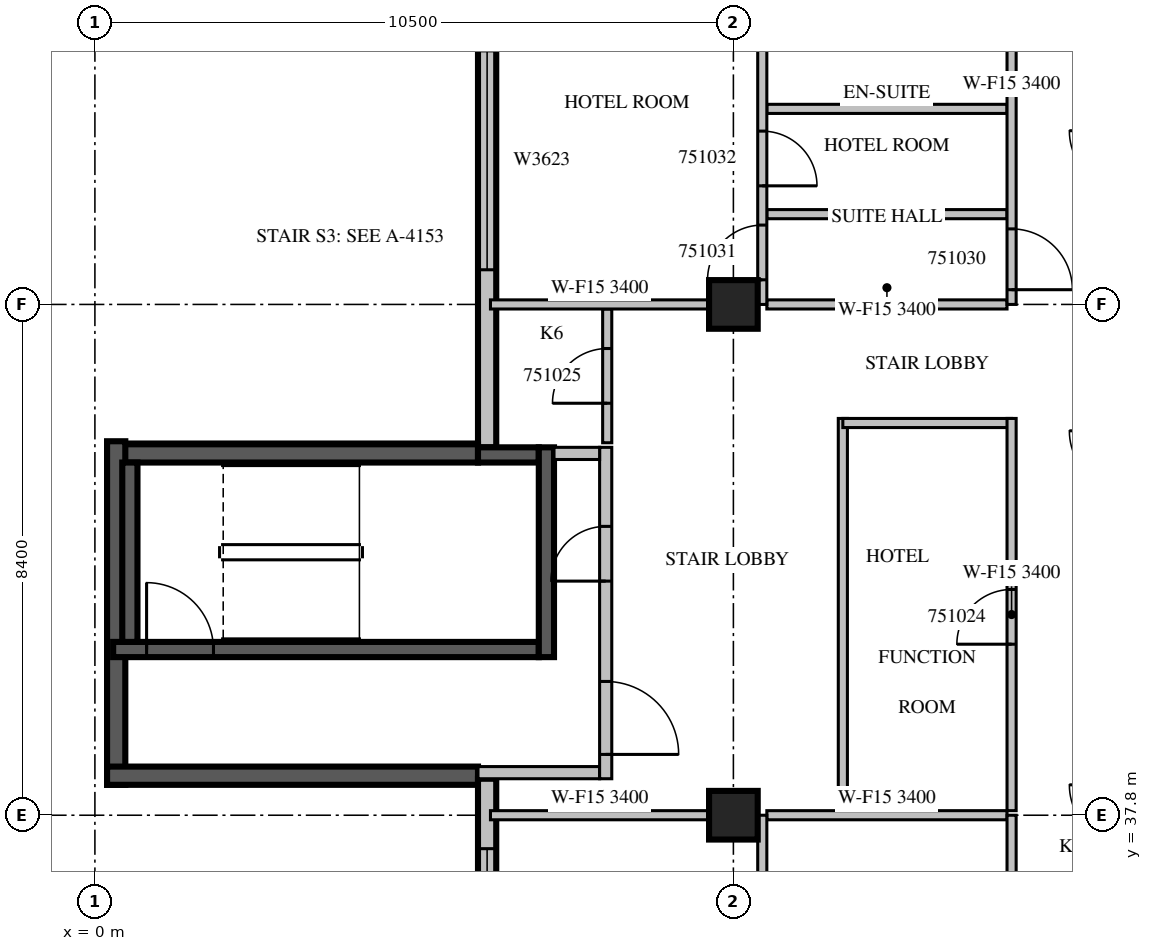
"""IFC4 building model, lengths in metres.
Left out: names, types, materials, properties, quantities, classifications, styles, units other than length and angle.
Written with IfcOpenShell. Run it as: python <this file> out.ifc"""

import sys

from ifc_helpers import new_model, si_unit, direction, frame, frame_2d, origin, origin_2d, place, context, subcontext, project, spatial, rectangle, extrude, source, transform, mapped, element, fill, save


model = new_model("IFC4")
c1 = context("Model", 3, precision=1e-05, world=origin(), true_north=direction((0.0, 1.0)))
c2 = subcontext(c1, "Body", "Model", "MODEL_VIEW")
j1 = project(units=[si_unit("LENGTHUNIT", "METRE"), si_unit("PLANEANGLEUNIT", "RADIAN")], contexts=[c1])
p1 = place(None, origin())
s1 = spatial("IfcSite", under=j1, at=p1, CompositionType="ELEMENT")
p2 = place(p1, origin())
s2 = spatial("IfcBuilding", under=s1, at=p2, CompositionType="ELEMENT")
p3 = place(p2, frame((0.0, 0.0, 227.2)))
s3 = spatial("IfcBuildingStorey", under=s2, at=p3, CompositionType="ELEMENT", Elevation=227.2)
m1 = source(origin(), c2, "Body", "SweptSolid", [
    extrude(rectangle(XDim=0.8, YDim=0.8, at=origin_2d()), origin(), (0.0, 0.0, 1.0), 3.8),
])
for number, where, z_axis, x_axis in (
    (1, (10.5, 37.8, 0.0), (0.0, 0.0, 1.0), (1.0, 0.0, 0.0)),
    (2, (10.5, 46.2, 0.0), (0.0, 0.0, 1.0), (1.0, 0.0, 0.0)),
):
    element("IfcColumn", number, at=place(p3, frame(where, z_axis=z_axis, x_axis=x_axis)), inside=s3, PredefinedType="COLUMN", context=c2, shape_type="MappedRepresentation", body=[
        mapped(m1, transform((0.0, 0.0, 0.0), scale=1.0)),
    ])
m2 = source(origin(), c2, "Body", "SweptSolid", [
    extrude(rectangle(XDim=9.91, YDim=0.3, at=frame_2d((4.955, 0.0))), origin(), (0.0, 0.0, 1.0), 3.4),
])
p4 = place(p3, frame((6.45, 53.76, 0.0), z_axis=(0.0, 0.0, 1.0), x_axis=(0.0, -1.0, 0.0)))
e3 = element("IfcWall", 3, at=p4, inside=s3, PredefinedType="STANDARD", context=c2, shape_type="MappedRepresentation", body=[
    mapped(m2, transform((0.0, 0.0, 0.0), scale=1.0)),
])
m3 = source(origin(), c2, "Body", "SweptSolid", [
    extrude(rectangle(XDim=3.6, YDim=2.3, at=frame_2d((1.8, 1.15))), frame((0.0, 0.16, 0.0), z_axis=(0.0, -1.0, 0.0), x_axis=(1.0, 0.0, 0.0)), (0.0, 0.0, 1.0), 0.32),
])
p5 = place(p4, frame((3.39, 0.0, 0.6)))
e4 = element("IfcOpeningElement", 4, at=p5, cuts=e3, PredefinedType="OPENING", context=c2, shape_type="MappedRepresentation", body=[
    mapped(m3, transform((0.0, 0.0, 0.0), scale=1.0)),
])
m4 = source(origin(), c2, "Body", "SweptSolid", [
    extrude(rectangle(XDim=2.4, YDim=2.3, at=frame_2d((1.2, 1.15))), frame((0.0, 0.16, 0.0), z_axis=(0.0, -1.0, 0.0), x_axis=(1.0, 0.0, 0.0)), (0.0, 0.0, 1.0), 0.32),
])
p6 = place(p4, frame((0.495, 0.0, 0.6)))
e5 = element("IfcOpeningElement", 5, at=p6, cuts=e3, PredefinedType="OPENING", context=c2, shape_type="MappedRepresentation", body=[
    mapped(m4, transform((0.0, 0.0, 0.0), scale=1.0)),
])
m5 = source(origin(), c2, "Body", "SweptSolid", [
    extrude(rectangle(XDim=6.1, YDim=0.3, at=frame_2d((3.05, 0.0))), origin(), (0.0, 0.0, 1.0), 3.4),
])
p7 = place(p3, frame((6.3, 43.75, 0.0), z_axis=(0.0, 0.0, 1.0), x_axis=(-1.0, 0.0, 0.0)))
e6 = element("IfcWall", 6, at=p7, inside=s3, PredefinedType="SOLIDWALL", context=c2, shape_type="MappedRepresentation", body=[
    mapped(m5, transform((0.0, 0.0, 0.0), scale=1.0)),
])
m6 = source(origin(), c2, "Body", "SweptSolid", [
    extrude(rectangle(XDim=5.65, YDim=0.3, at=frame_2d((2.825, 0.0))), origin(), (0.0, 0.0, 1.0), 3.4),
])
p8 = place(p3, frame((0.35, 43.95, 0.0), z_axis=(0.0, 0.0, 1.0), x_axis=(0.0, -1.0, 0.0)))
e7 = element("IfcWall", 7, at=p8, inside=s3, PredefinedType="SOLIDWALL", context=c2, shape_type="MappedRepresentation", body=[
    mapped(m6, transform((0.0, 0.0, 0.0), scale=1.0)),
])
p9 = place(p3, frame((0.2, 38.45, 0.0), z_axis=(0.0, 0.0, 1.0), x_axis=(1.0, 0.0, 0.0)))
e8 = element("IfcWall", 8, at=p9, inside=s3, PredefinedType="SOLIDWALL", context=c2, shape_type="MappedRepresentation", body=[
    mapped(m5, transform((0.0, 0.0, 0.0), scale=1.0)),
])
m7 = source(origin(), c2, "Body", "SweptSolid", [
    extrude(rectangle(XDim=4.2, YDim=0.3, at=frame_2d((2.1, 0.0))), origin(), (0.0, 0.0, 1.0), 3.4),
])
p10 = place(p3, frame((6.45, 38.4, 0.0), z_axis=(0.0, 0.0, 1.0), x_axis=(0.0, -1.0, 0.0)))
e9 = element("IfcWall", 9, at=p10, inside=s3, PredefinedType="STANDARD", context=c2, shape_type="MappedRepresentation", body=[
    mapped(m7, transform((0.0, 0.0, 0.0), scale=1.0)),
])
m8 = source(origin(), c2, "Body", "SweptSolid", [
    extrude(rectangle(XDim=1.8, YDim=2.3, at=frame_2d((0.9, 1.15))), frame((0.0, 0.16, 0.0), z_axis=(0.0, -1.0, 0.0), x_axis=(1.0, 0.0, 0.0)), (0.0, 0.0, 1.0), 0.32),
])
p11 = place(p10, frame((1.15, 0.0, 0.6)))
e10 = element("IfcOpeningElement", 10, at=p11, cuts=e9, PredefinedType="OPENING", context=c2, shape_type="MappedRepresentation", body=[
    mapped(m8, transform((0.0, 0.0, 0.0), scale=1.0)),
])
m9 = source(origin(), c2, "Body", "SweptSolid", [
    extrude(rectangle(XDim=7.0, YDim=0.25, at=frame_2d((3.5, 0.0))), origin(), (0.0, 0.0, 1.0), 3.4),
])
p12 = place(p3, frame((0.3, 40.525, 0.0), z_axis=(0.0, 0.0, 1.0), x_axis=(1.0, 0.0, 0.0)))
e11 = element("IfcWall", 11, at=p12, inside=s3, PredefinedType="SOLIDWALL", context=c2, shape_type="MappedRepresentation", body=[
    mapped(m9, transform((0.0, 0.0, 0.0), scale=1.0)),
])
m10 = source(origin(), c2, "Body", "SweptSolid", [
    extrude(rectangle(XDim=1.1, YDim=2.1, at=frame_2d((0.55, 1.05))), frame((0.0, 0.135, 0.0), z_axis=(0.0, -1.0, 0.0), x_axis=(1.0, 0.0, 0.0)), (0.0, 0.0, 1.0), 0.27),
])
p13 = place(p12, frame((0.55, 0.0, 0.0)))
e12 = element("IfcOpeningElement", 12, at=p13, cuts=e11, PredefinedType="OPENING", context=c2, shape_type="MappedRepresentation", body=[
    mapped(m10, transform((0.0, 0.0, 0.0), scale=1.0)),
])
m11 = source(origin(), c2, "Body", "SweptSolid", [
    extrude(rectangle(XDim=1.0, YDim=0.25, at=frame_2d((0.5, 0.0))), origin(), (0.0, 0.0, 1.0), 3.4),
])
p14 = place(p3, frame((6.3, 43.725, 0.0), z_axis=(0.0, 0.0, 1.0), x_axis=(1.0, 0.0, 0.0)))
e13 = element("IfcWall", 13, at=p14, inside=s3, PredefinedType="SOLIDWALL", context=c2, shape_type="MappedRepresentation", body=[
    mapped(m11, transform((0.0, 0.0, 0.0), scale=1.0)),
])
m12 = source(origin(), c2, "Body", "SweptSolid", [
    extrude(rectangle(XDim=3.45, YDim=0.25, at=frame_2d((1.725, 0.0))), origin(), (0.0, 0.0, 1.0), 3.4),
])
p15 = place(p3, frame((7.425, 40.4, 0.0), z_axis=(0.0, 0.0, 1.0), x_axis=(0.0, 1.0, 0.0)))
e14 = element("IfcWall", 14, at=p15, inside=s3, PredefinedType="SOLIDWALL", context=c2, shape_type="MappedRepresentation", body=[
    mapped(m12, transform((0.0, 0.0, 0.0), scale=1.0)),
])
m13 = source(origin(), c2, "Body", "SweptSolid", [
    extrude(rectangle(XDim=2.95, YDim=0.25, at=frame_2d((1.475, 0.0))), origin(), (0.0, 0.0, 1.0), 3.4),
])
p16 = place(p3, frame((0.575, 40.65, 0.0), z_axis=(0.0, 0.0, 1.0), x_axis=(0.0, 1.0, 0.0)))
e15 = element("IfcWall", 15, at=p16, inside=s3, PredefinedType="SOLIDWALL", context=c2, shape_type="MappedRepresentation", body=[
    mapped(m13, transform((0.0, 0.0, 0.0), scale=1.0)),
])
m14 = source(origin(), c2, "Body", "SweptSolid", [
    extrude(rectangle(XDim=2.0, YDim=0.2, at=frame_2d((1.0, 0.0))), origin(), (0.0, 0.0, 1.0), 3.4),
])
p17 = place(p3, frame((6.3, 38.5, 0.0), z_axis=(0.0, 0.0, 1.0), x_axis=(1.0, 0.0, 0.0)))
e16 = element("IfcWall", 16, at=p17, inside=s3, PredefinedType="PARTITIONING", context=c2, shape_type="MappedRepresentation", body=[
    mapped(m14, transform((0.0, 0.0, 0.0), scale=1.0)),
])
m15 = source(origin(), c2, "Body", "SweptSolid", [
    extrude(rectangle(XDim=5.45, YDim=0.2, at=frame_2d((2.725, 0.0))), origin(), (0.0, 0.0, 1.0), 3.4),
])
p18 = place(p3, frame((8.4, 38.4, 0.0), z_axis=(0.0, 0.0, 1.0), x_axis=(0.0, 1.0, 0.0)))
e17 = element("IfcWall", 17, at=p18, inside=s3, PredefinedType="PARTITIONING", context=c2, shape_type="MappedRepresentation", body=[
    mapped(m15, transform((0.0, 0.0, 0.0), scale=1.0)),
])
m16 = source(origin(), c2, "Body", "SweptSolid", [
    extrude(rectangle(XDim=1.2, YDim=2.1, at=frame_2d((0.6, 1.05))), frame((0.0, 0.11, 0.0), z_axis=(0.0, -1.0, 0.0), x_axis=(1.0, 0.0, 0.0)), (0.0, 0.0, 1.0), 0.22),
])
p19 = place(p18, frame((0.4, 0.0, 0.0)))
e18 = element("IfcOpeningElement", 18, at=p19, cuts=e17, PredefinedType="OPENING", context=c2, shape_type="MappedRepresentation", body=[
    mapped(m16, transform((0.0, 0.0, 0.0), scale=1.0)),
])
m17 = source(origin(), c2, "Body", "SweptSolid", [
    extrude(rectangle(XDim=0.9, YDim=2.1, at=frame_2d((0.45, 1.05))), frame((0.0, 0.11, 0.0), z_axis=(0.0, -1.0, 0.0), x_axis=(1.0, 0.0, 0.0)), (0.0, 0.0, 1.0), 0.22),
])
p20 = place(p18, frame((3.25, 0.0, 0.0)))
e19 = element("IfcOpeningElement", 19, at=p20, cuts=e17, PredefinedType="OPENING", context=c2, shape_type="MappedRepresentation", body=[
    mapped(m17, transform((0.0, 0.0, 0.0), scale=1.0)),
])
m18 = source(origin(), c2, "Body", "SweptSolid", [
    extrude(rectangle(XDim=0.75, YDim=0.2, at=frame_2d((0.375, 0.0))), origin(), (0.0, 0.0, 1.0), 3.4),
])
p21 = place(p3, frame((7.55, 43.75, 0.0), z_axis=(0.0, 0.0, 1.0), x_axis=(1.0, 0.0, 0.0)))
e20 = element("IfcWall", 20, at=p21, inside=s3, PredefinedType="PARTITIONING", context=c2, shape_type="MappedRepresentation", body=[
    mapped(m18, transform((0.0, 0.0, 0.0), scale=1.0)),
])
m19 = source(origin(), c2, "Body", "SweptSolid", [
    extrude(rectangle(XDim=6.45, YDim=0.15, at=frame_2d((3.225, 0.0))), origin(), (0.0, 0.0, 1.0), 3.4),
])
p22 = place(p3, frame((12.3, 44.325, 0.0), z_axis=(0.0, 0.0, 1.0), x_axis=(0.0, -1.0, 0.0)))
e21 = element("IfcWall", 21, at=p22, inside=s3, PredefinedType="PARTITIONING", context=c2, shape_type="MappedRepresentation", body=[
    mapped(m19, transform((0.0, 0.0, 0.0), scale=1.0)),
])
m20 = source(origin(), c2, "Body", "SweptSolid", [
    extrude(rectangle(XDim=2.775, YDim=0.15, at=frame_2d((1.387, 0.0))), origin(), (0.0, 0.0, 1.0), 3.4),
])
p23 = place(p3, frame((15.075, 44.25, 0.0), z_axis=(0.0, 0.0, 1.0), x_axis=(-1.0, 0.0, 0.0)))
e22 = element("IfcWall", 22, at=p23, inside=s3, PredefinedType="PARTITIONING", context=c2, shape_type="MappedRepresentation", body=[
    mapped(m20, transform((0.0, 0.0, 0.0), scale=1.0)),
])
p24 = place(p3, frame((15.075, 37.875, 0.0), z_axis=(0.0, 0.0, 1.0), x_axis=(0.0, 1.0, 0.0)))
e23 = element("IfcWall", 23, at=p24, inside=s3, PredefinedType="PARTITIONING", context=c2, shape_type="MappedRepresentation", body=[
    mapped(m19, transform((0.0, 0.0, 0.0), scale=1.0)),
])
m21 = source(origin(), c2, "Body", "SweptSolid", [
    extrude(rectangle(XDim=0.9, YDim=2.1, at=frame_2d((0.45, 1.05))), frame((0.0, 0.085, 0.0), z_axis=(0.0, -1.0, 0.0), x_axis=(1.0, 0.0, 0.0)), (0.0, 0.0, 1.0), 0.17),
])
p25 = place(p24, frame((2.737, 0.0, 0.0)))
e24 = element("IfcOpeningElement", 24, at=p25, cuts=e23, PredefinedType="OPENING", context=c2, shape_type="MappedRepresentation", body=[
    mapped(m21, transform((0.0, 0.0, 0.0), scale=1.0)),
])
m22 = source(origin(), c2, "Body", "SweptSolid", [
    extrude(rectangle(XDim=2.2, YDim=0.15, at=frame_2d((1.1, 0.0))), origin(), (0.0, 0.0, 1.0), 3.4),
])
p26 = place(p3, frame((8.425, 43.925, 0.0), z_axis=(0.0, 0.0, 1.0), x_axis=(0.0, 1.0, 0.0)))
e25 = element("IfcWall", 25, at=p26, inside=s3, PredefinedType="PARTITIONING", context=c2, shape_type="MappedRepresentation", body=[
    mapped(m22, transform((0.0, 0.0, 0.0), scale=1.0)),
])
p27 = place(p26, frame((0.65, 0.0, 0.0)))
e26 = element("IfcOpeningElement", 26, at=p27, cuts=e25, PredefinedType="OPENING", context=c2, shape_type="MappedRepresentation", body=[
    mapped(m21, transform((0.0, 0.0, 0.0), scale=1.0)),
])
m23 = source(origin(), c2, "Body", "SweptSolid", [
    extrude(rectangle(XDim=3.596, YDim=0.15, at=frame_2d((1.798, 0.0))), origin(), (0.0, 0.0, 1.0), 3.4),
])
p28 = place(p3, frame((10.101, 37.8, 0.0), z_axis=(0.0, 0.0, 1.0), x_axis=(-1.0, 0.0, 0.0)))
e27 = element("IfcWall", 27, at=p28, inside=s3, PredefinedType="PARTITIONING", context=c2, shape_type="MappedRepresentation", body=[
    mapped(m23, transform((0.0, 0.0, 0.0), scale=1.0)),
])
m24 = source(origin(), c2, "Body", "SweptSolid", [
    extrude(rectangle(XDim=3.95, YDim=0.15, at=frame_2d((1.975, 0.0))), origin(), (0.0, 0.0, 1.0), 3.4),
])
p29 = place(p3, frame((15.0, 37.8, 0.0), z_axis=(0.0, 0.0, 1.0), x_axis=(-1.0, 0.0, 0.0)))
e28 = element("IfcWall", 28, at=p29, inside=s3, PredefinedType="PARTITIONING", context=c2, shape_type="MappedRepresentation", body=[
    mapped(m24, transform((0.0, 0.0, 0.0), scale=1.0)),
])
m25 = source(origin(), c2, "Body", "SweptSolid", [
    extrude(rectangle(XDim=8.4, YDim=0.15, at=frame_2d((4.2, 0.0))), origin(), (0.0, 0.0, 1.0), 3.4),
])
p30 = place(p3, frame((10.975, 29.4, 0.0), z_axis=(0.0, 0.0, 1.0), x_axis=(0.0, 1.0, 0.0)))
e29 = element("IfcWall", 29, at=p30, inside=s3, PredefinedType="PARTITIONING", context=c2, shape_type="MappedRepresentation", body=[
    mapped(m25, transform((0.0, 0.0, 0.0), scale=1.0)),
])
p31 = place(p30, frame((0.408, 0.0, 0.0)))
e30 = element("IfcOpeningElement", 30, at=p31, cuts=e29, PredefinedType="OPENING", context=c2, shape_type="MappedRepresentation", body=[
    mapped(m21, transform((0.0, 0.0, 0.0), scale=1.0)),
])
p32 = place(p30, frame((2.328, 0.0, 0.0)))
e31 = element("IfcOpeningElement", 31, at=p32, cuts=e29, PredefinedType="OPENING", context=c2, shape_type="MappedRepresentation", body=[
    mapped(m21, transform((0.0, 0.0, 0.0), scale=1.0)),
])
for number, where, z_axis, x_axis in (
    (32, (15.0, 47.684, 0.0), (0.0, 0.0, 1.0), (-1.0, 0.0, 0.0)),
    (33, (15.0, 49.416, 0.0), (0.0, 0.0, 1.0), (-1.0, 0.0, 0.0)),
):
    element("IfcWall", number, at=place(p3, frame(where, z_axis=z_axis, x_axis=x_axis)), inside=s3, PredefinedType="PARTITIONING", context=c2, shape_type="MappedRepresentation", body=[
        mapped(m24, transform((0.0, 0.0, 0.0), scale=1.0)),
    ])
p33 = place(p3, frame((10.101, 46.2, 0.0), z_axis=(0.0, 0.0, 1.0), x_axis=(-1.0, 0.0, 0.0)))
e34 = element("IfcWall", 34, at=p33, inside=s3, PredefinedType="PARTITIONING", context=c2, shape_type="MappedRepresentation", body=[
    mapped(m23, transform((0.0, 0.0, 0.0), scale=1.0)),
])
p34 = place(p3, frame((15.0, 46.2, 0.0), z_axis=(0.0, 0.0, 1.0), x_axis=(-1.0, 0.0, 0.0)))
e35 = element("IfcWall", 35, at=p34, inside=s3, PredefinedType="PARTITIONING", context=c2, shape_type="MappedRepresentation", body=[
    mapped(m24, transform((0.0, 0.0, 0.0), scale=1.0)),
])
m26 = source(origin(), c2, "Body", "SweptSolid", [
    extrude(rectangle(XDim=7.26, YDim=0.15, at=frame_2d((3.63, 0.0))), origin(), (0.0, 0.0, 1.0), 3.4),
])
p35 = place(p3, frame((10.975, 46.2, 0.0), z_axis=(0.0, 0.0, 1.0), x_axis=(0.0, 1.0, 0.0)))
e36 = element("IfcWall", 36, at=p35, inside=s3, PredefinedType="PARTITIONING", context=c2, shape_type="MappedRepresentation", body=[
    mapped(m26, transform((0.0, 0.0, 0.0), scale=1.0)),
])
p36 = place(p35, frame((0.405, 0.0, 0.0)))
e37 = element("IfcOpeningElement", 37, at=p36, cuts=e36, PredefinedType="OPENING", context=c2, shape_type="MappedRepresentation", body=[
    mapped(m21, transform((0.0, 0.0, 0.0), scale=1.0)),
])
p37 = place(p35, frame((1.95, 0.0, 0.0)))
e38 = element("IfcOpeningElement", 38, at=p37, cuts=e36, PredefinedType="OPENING", context=c2, shape_type="MappedRepresentation", body=[
    mapped(m21, transform((0.0, 0.0, 0.0), scale=1.0)),
])
p38 = place(p3, frame((15.075, 29.4, 0.0), z_axis=(0.0, 0.0, 1.0), x_axis=(0.0, 1.0, 0.0)))
e39 = element("IfcWall", 39, at=p38, inside=s3, PredefinedType="PARTITIONING", context=c2, shape_type="MappedRepresentation", body=[
    mapped(m25, transform((0.0, 0.0, 0.0), scale=1.0)),
])
m27 = source(origin(), c2, "Body", "SweptSolid", [
    extrude(rectangle(XDim=1.0, YDim=2.1, at=frame_2d((0.5, 1.05))), frame((0.0, 0.085, 0.0), z_axis=(0.0, -1.0, 0.0), x_axis=(1.0, 0.0, 0.0)), (0.0, 0.0, 1.0), 0.17),
])
p39 = place(p38, frame((0.245, 0.0, 0.0)))
e40 = element("IfcOpeningElement", 40, at=p39, cuts=e39, PredefinedType="OPENING", context=c2, shape_type="MappedRepresentation", body=[
    mapped(m27, transform((0.0, 0.0, 0.0), scale=1.0)),
])
p40 = place(p38, frame((5.733, 0.0, 0.0)))
e41 = element("IfcOpeningElement", 41, at=p40, cuts=e39, PredefinedType="OPENING", context=c2, shape_type="MappedRepresentation", body=[
    mapped(m21, transform((0.0, 0.0, 0.0), scale=1.0)),
])
p41 = place(p3, frame((15.075, 46.2, 0.0), z_axis=(0.0, 0.0, 1.0), x_axis=(0.0, 1.0, 0.0)))
e42 = element("IfcWall", 42, at=p41, inside=s3, PredefinedType="PARTITIONING", context=c2, shape_type="MappedRepresentation", body=[
    mapped(m26, transform((0.0, 0.0, 0.0), scale=1.0)),
])
p42 = place(p41, frame((0.242, 0.0, 0.0)))
e43 = element("IfcOpeningElement", 43, at=p42, cuts=e42, PredefinedType="OPENING", context=c2, shape_type="MappedRepresentation", body=[
    mapped(m27, transform((0.0, 0.0, 0.0), scale=1.0)),
])
p43 = place(p41, frame((4.825, 0.0, 0.0)))
e44 = element("IfcOpeningElement", 44, at=p43, cuts=e42, PredefinedType="OPENING", context=c2, shape_type="MappedRepresentation", body=[
    mapped(m21, transform((0.0, 0.0, 0.0), scale=1.0)),
])
m28 = source(origin(), c2, "Body", "SweptSolid", [
    extrude(rectangle(XDim=3.6, YDim=2.3, at=frame_2d((1.8, 1.15))), frame((0.0, 0.03, 0.0), z_axis=(0.0, -1.0, 0.0), x_axis=(1.0, 0.0, 0.0)), (0.0, 0.0, 1.0), 0.06),
])
p44 = place(p5, origin())
e45 = element("IfcWindow", 45, at=p44, inside=s3, PartitioningType="SINGLE_PANEL", PredefinedType="WINDOW", context=c2, shape_type="MappedRepresentation", body=[
    mapped(m28, transform((0.0, 0.0, 0.0), scale=1.0)),
])
fill(e4, e45)
m29 = source(origin(), c2, "Body", "SweptSolid", [
    extrude(rectangle(XDim=1.8, YDim=2.3, at=frame_2d((0.9, 1.15))), frame((0.0, 0.03, 0.0), z_axis=(0.0, -1.0, 0.0), x_axis=(1.0, 0.0, 0.0)), (0.0, 0.0, 1.0), 0.06),
])
p45 = place(p11, origin())
e46 = element("IfcWindow", 46, at=p45, inside=s3, PartitioningType="SINGLE_PANEL", PredefinedType="WINDOW", context=c2, shape_type="MappedRepresentation", body=[
    mapped(m29, transform((0.0, 0.0, 0.0), scale=1.0)),
])
fill(e10, e46)
m30 = source(origin(), c2, "Body", "SweptSolid", [
    extrude(rectangle(XDim=1.1, YDim=2.1, at=frame_2d((0.55, 1.05))), frame((0.0, 0.025, 0.0), z_axis=(0.0, -1.0, 0.0), x_axis=(1.0, 0.0, 0.0)), (0.0, 0.0, 1.0), 0.05),
])
p46 = place(p13, origin())
e47 = element("IfcDoor", 47, at=p46, inside=s3, OperationType="SINGLE_SWING_LEFT", PredefinedType="DOOR", context=c2, shape_type="MappedRepresentation", body=[
    mapped(m30, transform((0.0, 0.0, 0.0), scale=1.0)),
])
fill(e12, e47)
m31 = source(origin(), c2, "Body", "SweptSolid", [
    extrude(rectangle(XDim=1.2, YDim=2.1, at=frame_2d((0.6, 1.05))), frame((0.0, 0.025, 0.0), z_axis=(0.0, -1.0, 0.0), x_axis=(1.0, 0.0, 0.0)), (0.0, 0.0, 1.0), 0.05),
])
p47 = place(p19, origin())
e48 = element("IfcDoor", 48, at=p47, inside=s3, OperationType="SINGLE_SWING_RIGHT", PredefinedType="DOOR", context=c2, shape_type="MappedRepresentation", body=[
    mapped(m31, transform((0.0, 0.0, 0.0), scale=1.0)),
])
fill(e18, e48)
m32 = source(origin(), c2, "Body", "SweptSolid", [
    extrude(rectangle(XDim=0.9, YDim=2.1, at=frame_2d((0.45, 1.05))), frame((0.0, 0.025, 0.0), z_axis=(0.0, -1.0, 0.0), x_axis=(1.0, 0.0, 0.0)), (0.0, 0.0, 1.0), 0.05),
])
p48 = place(p20, origin())
e49 = element("IfcDoor", 49, at=p48, inside=s3, OperationType="SINGLE_SWING_LEFT", PredefinedType="DOOR", context=c2, shape_type="MappedRepresentation", body=[
    mapped(m32, transform((0.0, 0.0, 0.0), scale=1.0)),
])
fill(e19, e49)
p49 = place(p25, origin())
e50 = element("IfcDoor", 50, at=p49, inside=s3, OperationType="SINGLE_SWING_LEFT", PredefinedType="DOOR", context=c2, shape_type="MappedRepresentation", body=[
    mapped(m32, transform((0.0, 0.0, 0.0), scale=1.0)),
])
fill(e24, e50)
p50 = place(p27, origin())
e51 = element("IfcDoor", 51, at=p50, inside=s3, OperationType="SINGLE_SWING_LEFT", PredefinedType="DOOR", context=c2, shape_type="MappedRepresentation", body=[
    mapped(m32, transform((0.0, 0.0, 0.0), scale=1.0)),
])
fill(e26, e51)
m33 = source(origin(), c2, "Body", "SweptSolid", [
    extrude(rectangle(XDim=1.0, YDim=2.1, at=frame_2d((0.5, 1.05))), frame((0.0, 0.025, 0.0), z_axis=(0.0, -1.0, 0.0), x_axis=(1.0, 0.0, 0.0)), (0.0, 0.0, 1.0), 0.05),
])
p51 = place(p42, origin())
e52 = element("IfcDoor", 52, at=p51, inside=s3, OperationType="SINGLE_SWING_RIGHT", PredefinedType="DOOR", context=c2, shape_type="MappedRepresentation", body=[
    mapped(m33, transform((0.0, 0.0, 0.0), scale=1.0)),
])
fill(e43, e52)
p52 = place(p36, origin())
e53 = element("IfcDoor", 53, at=p52, inside=s3, OperationType="SINGLE_SWING_LEFT", PredefinedType="DOOR", context=c2, shape_type="MappedRepresentation", body=[
    mapped(m32, transform((0.0, 0.0, 0.0), scale=1.0)),
])
fill(e37, e53)
p53 = place(p37, origin())
e54 = element("IfcDoor", 54, at=p53, inside=s3, OperationType="SINGLE_SWING_RIGHT", PredefinedType="DOOR", context=c2, shape_type="MappedRepresentation", body=[
    mapped(m32, transform((0.0, 0.0, 0.0), scale=1.0)),
])
fill(e38, e54)
save(model, sys.argv[1])
